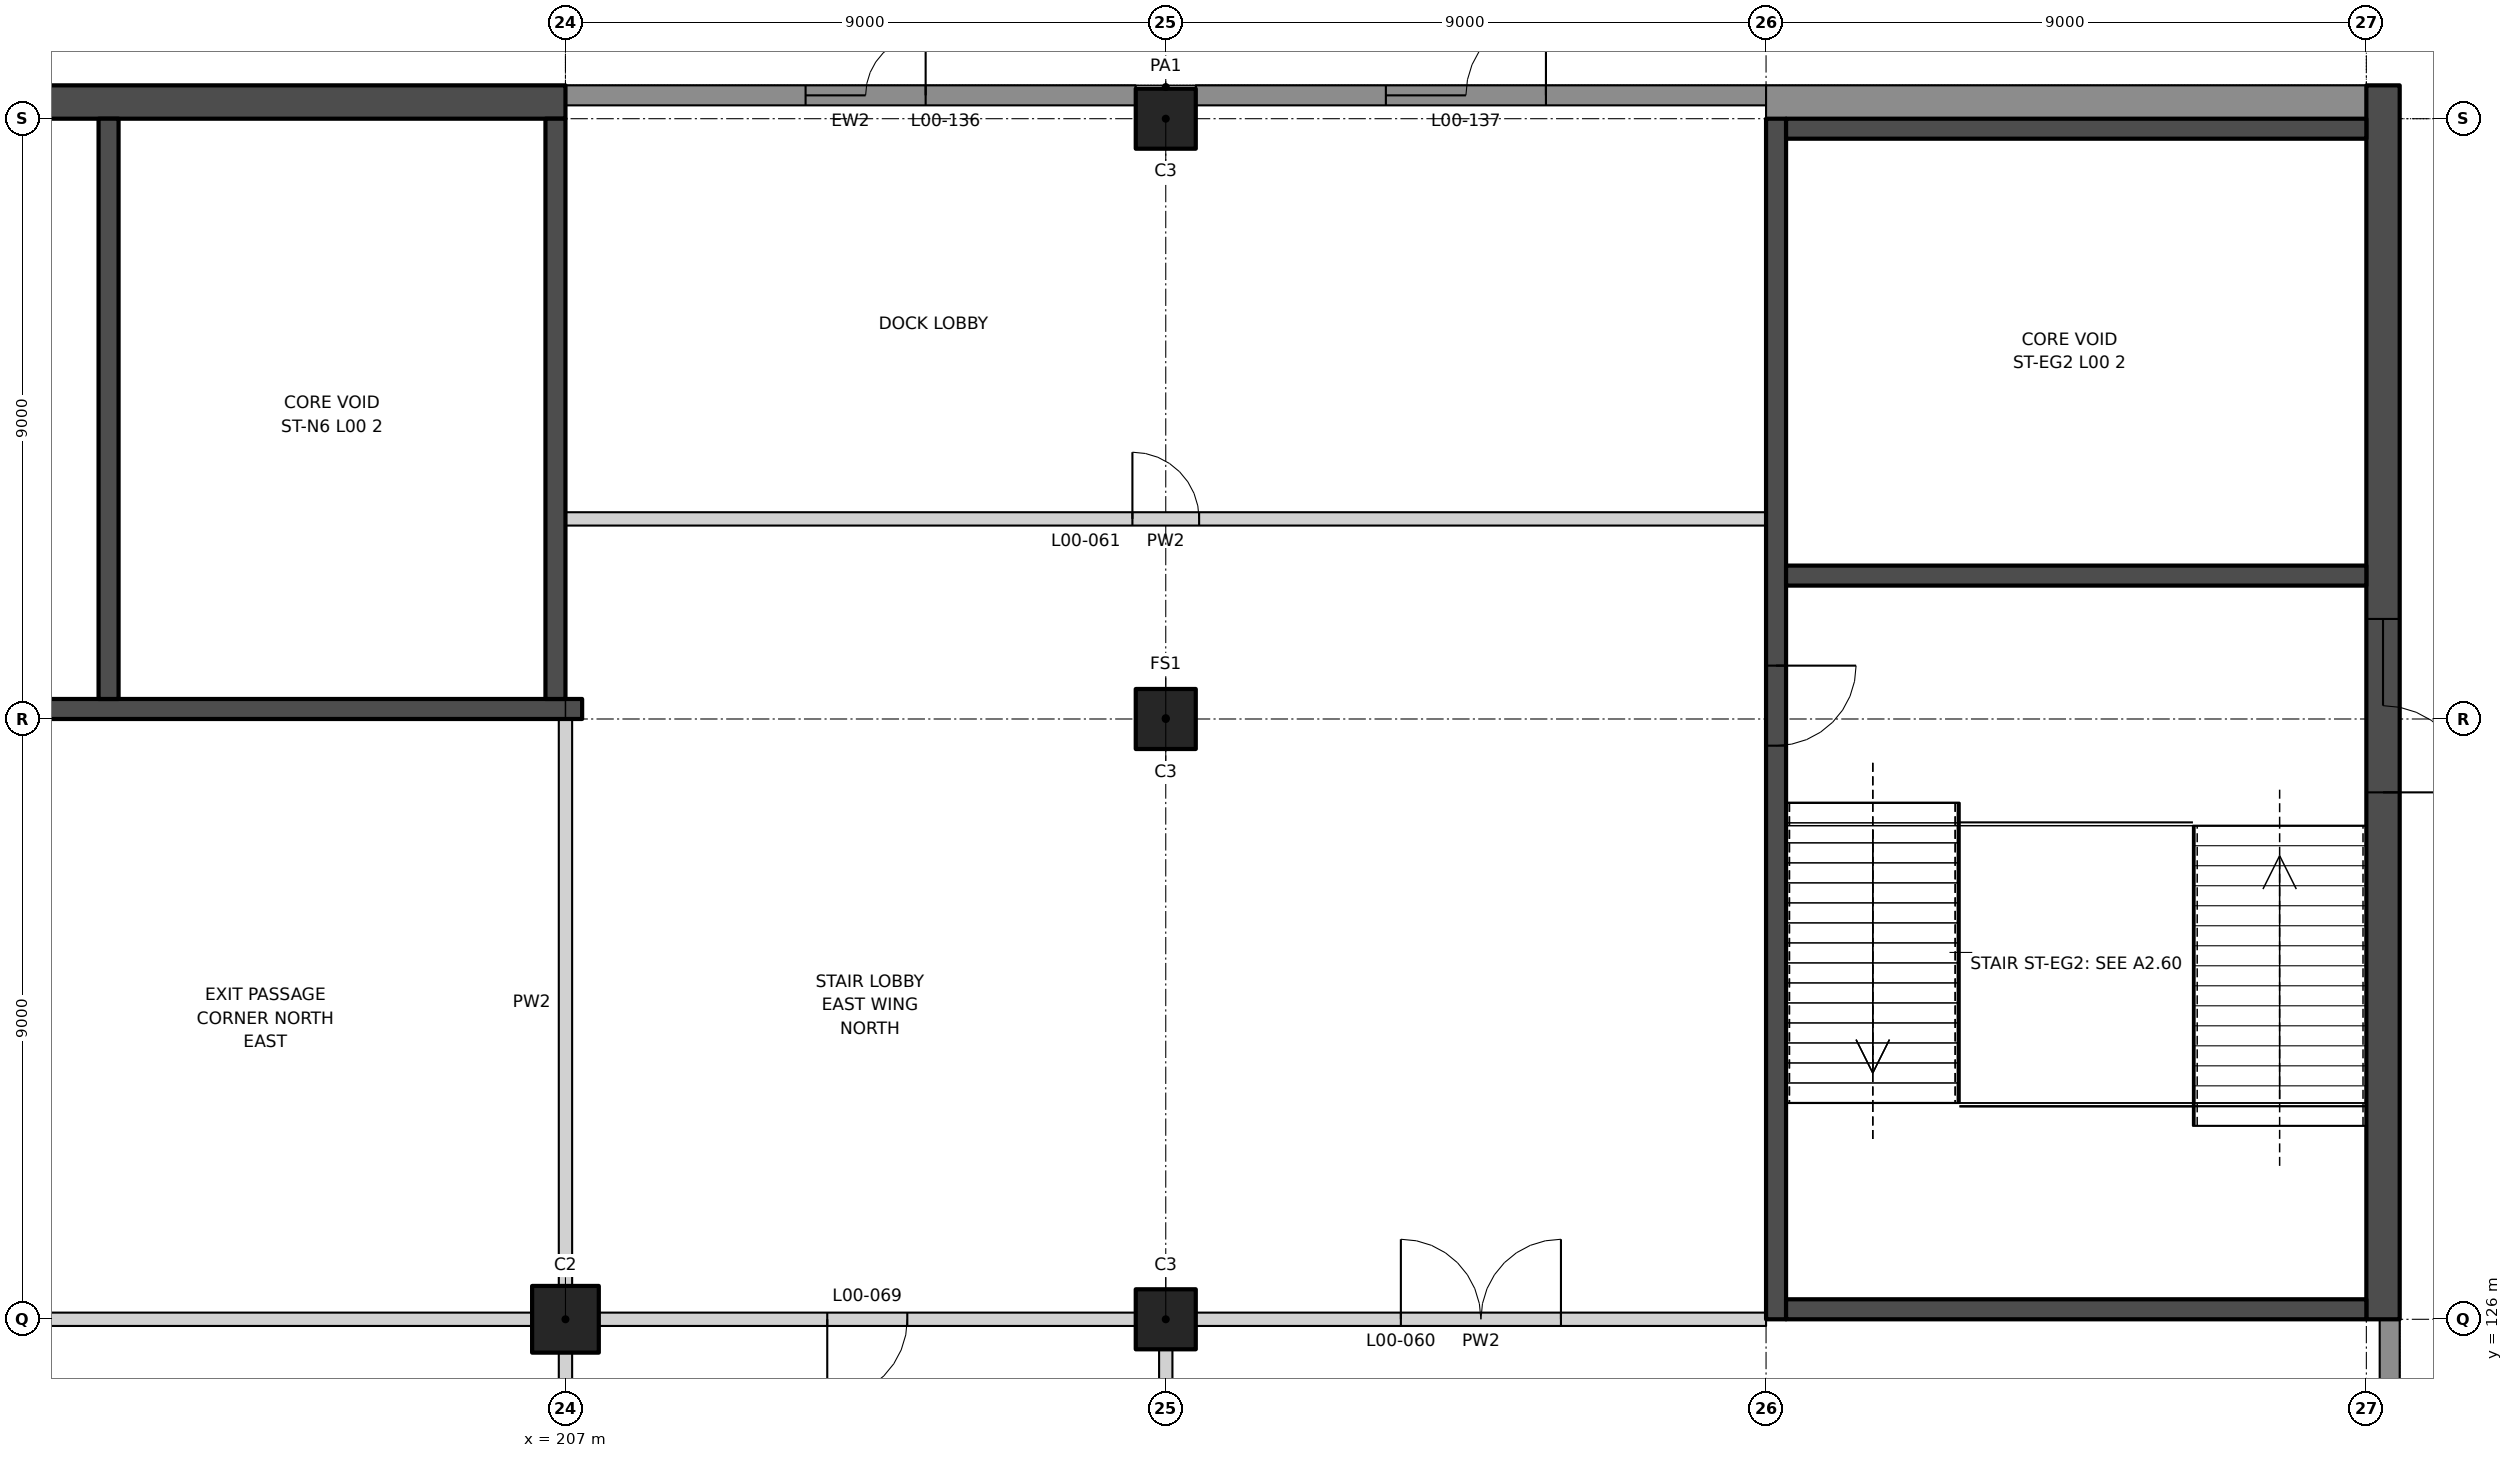
"""IFC4 building model, lengths in metres.
Left out: names, types, materials, properties, quantities, classifications, styles, units other than length and angle.
Written with IfcOpenShell. Run it as: python <this file> out.ifc"""

import sys

from ifc_helpers import new_model, si_unit, direction, frame, frame_2d, origin, origin_2d, place, context, subcontext, project, spatial, rectangle, extrude, element, fill, save


model = new_model("IFC4")
c1 = context("Model", 3, precision=1e-05, world=origin(), true_north=direction((0.0, 1.0)))
c2 = subcontext(c1, "Body", "Model", "MODEL_VIEW")
j1 = project(units=[si_unit("LENGTHUNIT", "METRE"), si_unit("PLANEANGLEUNIT", "RADIAN")], contexts=[c1])
p1 = place(None, origin())
s1 = spatial("IfcSite", under=j1, at=p1, CompositionType="ELEMENT")
p2 = place(p1, origin())
s2 = spatial("IfcBuilding", under=s1, at=p2, CompositionType="ELEMENT")
p3 = place(p2, origin())
s3 = spatial("IfcBuildingStorey", under=s2, at=p3, CompositionType="ELEMENT", Elevation=0.0)
p4 = place(p3, frame((207.0, 126.0, 0.0), z_axis=(0.0, 0.0, 1.0), x_axis=(1.0, 0.0, 0.0)))
e1 = element("IfcColumn", 1, at=p4, inside=s3, PredefinedType="COLUMN", context=c2, shape_type="SweptSolid", body=[
    extrude(rectangle(XDim=1.0, YDim=1.0, at=origin_2d()), origin(), (0.0, 0.0, 1.0), 7.0),
])
for number, where, z_axis, x_axis in (
    (2, (216.0, 126.0, 0.0), (0.0, 0.0, 1.0), (1.0, 0.0, 0.0)),
    (3, (216.0, 135.0, 0.0), (0.0, 0.0, 1.0), (1.0, 0.0, 0.0)),
    (4, (216.0, 144.0, 0.0), (0.0, 0.0, 1.0), (1.0, 0.0, 0.0)),
):
    element("IfcColumn", number, at=place(p3, frame(where, z_axis=z_axis, x_axis=x_axis)), inside=s3, PredefinedType="COLUMN", context=c2, shape_type="SweptSolid", body=[
        extrude(rectangle(XDim=0.9, YDim=0.9, at=origin_2d()), origin(), (0.0, 0.0, 1.0), 7.0),
    ])
p5 = place(p3, frame((198.45, 126.0, 0.0), z_axis=(0.0, 0.0, 1.0), x_axis=(1.0, 0.0, 0.0)))
e5 = element("IfcWall", 5, at=p5, inside=s3, PredefinedType="PARTITIONING", context=c2, shape_type="SweptSolid", body=[
    extrude(rectangle(XDim=8.05, YDim=0.2, at=frame_2d((4.025, 0.0))), origin(), (0.0, 0.0, 1.0), 5.75),
])
p6 = place(p3, frame((207.5, 126.0, 0.0), z_axis=(0.0, 0.0, 1.0), x_axis=(1.0, 0.0, 0.0)))
e6 = element("IfcWall", 6, at=p6, inside=s3, PredefinedType="PARTITIONING", context=c2, shape_type="SweptSolid", body=[
    extrude(rectangle(XDim=8.05, YDim=0.2, at=frame_2d((4.025, 0.0))), origin(), (0.0, 0.0, 1.0), 5.75),
])
p7 = place(p6, frame((3.425, 0.0, 0.0)))
e7 = element("IfcOpeningElement", 7, at=p7, cuts=e6, PredefinedType="OPENING", context=c2, shape_type="SweptSolid", body=[
    extrude(rectangle(XDim=1.2, YDim=2.1, at=frame_2d((0.6, 1.05))), frame((0.0, 0.11, 0.0), z_axis=(0.0, -1.0, 0.0), x_axis=(1.0, 0.0, 0.0)), (0.0, 0.0, 1.0), 0.22),
])
p8 = place(p3, frame((216.45, 126.0, 0.0), z_axis=(0.0, 0.0, 1.0), x_axis=(1.0, 0.0, 0.0)))
e8 = element("IfcWall", 8, at=p8, inside=s3, PredefinedType="PARTITIONING", context=c2, shape_type="SweptSolid", body=[
    extrude(rectangle(XDim=8.55, YDim=0.2, at=frame_2d((4.275, 0.0))), origin(), (0.0, 0.0, 1.0), 5.75),
])
p9 = place(p8, frame((3.075, 0.0, 0.0)))
e9 = element("IfcOpeningElement", 9, at=p9, cuts=e8, PredefinedType="OPENING", context=c2, shape_type="SweptSolid", body=[
    extrude(rectangle(XDim=2.4, YDim=2.4, at=frame_2d((1.2, 1.2))), frame((0.0, 0.11, 0.0), z_axis=(0.0, -1.0, 0.0), x_axis=(1.0, 0.0, 0.0)), (0.0, 0.0, 1.0), 0.22),
])
p10 = place(p3, frame((207.0, 138.0, 0.0), z_axis=(0.0, 0.0, 1.0), x_axis=(1.0, 0.0, 0.0)))
e10 = element("IfcWall", 10, at=p10, inside=s3, PredefinedType="PARTITIONING", context=c2, shape_type="SweptSolid", body=[
    extrude(rectangle(XDim=18.0, YDim=0.2, at=frame_2d((9.0, 0.0))), origin(), (0.0, 0.0, 1.0), 7.0),
])
p11 = place(p10, frame((8.5, 0.0, 0.0)))
e11 = element("IfcOpeningElement", 11, at=p11, cuts=e10, PredefinedType="OPENING", context=c2, shape_type="SweptSolid", body=[
    extrude(rectangle(XDim=1.0, YDim=2.1, at=frame_2d((0.5, 1.05))), frame((0.0, 0.11, 0.0), z_axis=(0.0, -1.0, 0.0), x_axis=(1.0, 0.0, 0.0)), (0.0, 0.0, 1.0), 0.22),
])
p12 = place(p3, frame((207.0, 117.5, 0.0), z_axis=(0.0, 0.0, 1.0), x_axis=(0.0, 1.0, 0.0)))
e12 = element("IfcWall", 12, at=p12, inside=s3, PredefinedType="PARTITIONING", context=c2, shape_type="SweptSolid", body=[
    extrude(rectangle(XDim=8.0, YDim=0.2, at=frame_2d((4.0, 0.0))), origin(), (0.0, 0.0, 1.0), 5.75),
])
p13 = place(p12, frame((0.2, 0.0, 0.0)))
e13 = element("IfcOpeningElement", 13, at=p13, cuts=e12, PredefinedType="OPENING", context=c2, shape_type="SweptSolid", body=[
    extrude(rectangle(XDim=1.0, YDim=2.1, at=frame_2d((0.5, 1.05))), frame((0.0, 0.11, 0.0), z_axis=(0.0, -1.0, 0.0), x_axis=(1.0, 0.0, 0.0)), (0.0, 0.0, 1.0), 0.22),
])
p14 = place(p3, frame((207.0, 126.5, 0.0), z_axis=(0.0, 0.0, 1.0), x_axis=(0.0, 1.0, 0.0)))
e14 = element("IfcWall", 14, at=p14, inside=s3, PredefinedType="PARTITIONING", context=c2, shape_type="SweptSolid", body=[
    extrude(rectangle(XDim=8.5, YDim=0.2, at=frame_2d((4.25, 0.0))), origin(), (0.0, 0.0, 1.0), 5.75),
])
p15 = place(p3, frame((216.0, 117.45, 0.0), z_axis=(0.0, 0.0, 1.0), x_axis=(0.0, 1.0, 0.0)))
e15 = element("IfcWall", 15, at=p15, inside=s3, PredefinedType="PARTITIONING", context=c2, shape_type="SweptSolid", body=[
    extrude(rectangle(XDim=8.1, YDim=0.2, at=frame_2d((4.05, 0.0))), origin(), (0.0, 0.0, 1.0), 5.75),
])
p16 = place(p3, frame((234.35, 117.45, 0.0), z_axis=(0.0, 0.0, 1.0), x_axis=(0.0, 1.0, 0.0)))
e16 = element("IfcWall", 16, at=p16, inside=s3, PredefinedType="SOLIDWALL", context=c2, shape_type="SweptSolid", body=[
    extrude(rectangle(XDim=8.55, YDim=0.3, at=frame_2d((4.275, 0.0))), origin(), (0.0, 0.0, 1.0), 7.0),
])
p17 = place(p16, frame((2.85, 0.0, 0.0)))
e17 = element("IfcOpeningElement", 17, at=p17, cuts=e16, PredefinedType="OPENING", context=c2, shape_type="SweptSolid", body=[
    extrude(rectangle(XDim=2.4, YDim=2.4, at=frame_2d((1.2, 1.2))), frame((0.0, 0.16, 0.0), z_axis=(0.0, -1.0, 0.0), x_axis=(1.0, 0.0, 0.0)), (0.0, 0.0, 1.0), 0.32),
])
p18 = place(p3, frame((215.55, 144.35, 0.0), z_axis=(0.0, 0.0, 1.0), x_axis=(-1.0, 0.0, 0.0)))
e18 = element("IfcWall", 18, at=p18, inside=s3, PredefinedType="SOLIDWALL", context=c2, shape_type="SweptSolid", body=[
    extrude(rectangle(XDim=8.55, YDim=0.3, at=frame_2d((4.275, 0.0))), origin(), (0.0, 0.0, 1.0), 7.0),
])
p19 = place(p18, frame((3.15, 0.0, 0.0)))
e19 = element("IfcOpeningElement", 19, at=p19, cuts=e18, PredefinedType="OPENING", context=c2, shape_type="SweptSolid", body=[
    extrude(rectangle(XDim=1.8, YDim=2.4, at=frame_2d((0.9, 1.2))), frame((0.0, 0.16, 0.0), z_axis=(0.0, -1.0, 0.0), x_axis=(1.0, 0.0, 0.0)), (0.0, 0.0, 1.0), 0.32),
])
p20 = place(p3, frame((225.0, 144.35, 0.0), z_axis=(0.0, 0.0, 1.0), x_axis=(-1.0, 0.0, 0.0)))
e20 = element("IfcWall", 20, at=p20, inside=s3, PredefinedType="SOLIDWALL", context=c2, shape_type="SweptSolid", body=[
    extrude(rectangle(XDim=8.55, YDim=0.3, at=frame_2d((4.275, 0.0))), origin(), (0.0, 0.0, 1.0), 7.0),
])
p21 = place(p20, frame((3.3, 0.0, 0.0)))
e21 = element("IfcOpeningElement", 21, at=p21, cuts=e20, PredefinedType="OPENING", context=c2, shape_type="SweptSolid", body=[
    extrude(rectangle(XDim=2.4, YDim=2.4, at=frame_2d((1.2, 1.2))), frame((0.0, 0.16, 0.0), z_axis=(0.0, -1.0, 0.0), x_axis=(1.0, 0.0, 0.0)), (0.0, 0.0, 1.0), 0.32),
])
p22 = place(p3, frame((234.0, 144.25, 0.0), z_axis=(0.0, 0.0, 1.0), x_axis=(-1.0, 0.0, 0.0)))
e22 = element("IfcWall", 22, at=p22, inside=s3, PredefinedType="SOLIDWALL", context=c2, shape_type="SweptSolid", body=[
    extrude(rectangle(XDim=9.0, YDim=0.5, at=frame_2d((4.5, 0.0))), origin(), (0.0, 0.0, 1.0), 7.0),
])
p23 = place(p3, frame((189.0, 135.15, 0.0), z_axis=(0.0, 0.0, 1.0), x_axis=(1.0, 0.0, 0.0)))
e23 = element("IfcWall", 23, at=p23, inside=s3, PredefinedType="SHEAR", context=c2, shape_type="SweptSolid", body=[
    extrude(rectangle(XDim=18.25, YDim=0.3, at=frame_2d((9.125, 0.0))), origin(), (0.0, 0.0, 1.0), 7.0),
])
p24 = place(p23, frame((1.5, 0.0, 0.0)))
e24 = element("IfcOpeningElement", 24, at=p24, cuts=e23, PredefinedType="OPENING", context=c2, shape_type="SweptSolid", body=[
    extrude(rectangle(XDim=1.2, YDim=2.1, at=frame_2d((0.6, 1.05))), frame((0.0, 0.16, 0.0), z_axis=(0.0, -1.0, 0.0), x_axis=(1.0, 0.0, 0.0)), (0.0, 0.0, 1.0), 0.32),
])
p25 = place(p3, frame((189.0, 144.25, 0.0), z_axis=(0.0, 0.0, 1.0), x_axis=(1.0, 0.0, 0.0)))
e25 = element("IfcWall", 25, at=p25, inside=s3, PredefinedType="SHEAR", context=c2, shape_type="SweptSolid", body=[
    extrude(rectangle(XDim=18.0, YDim=0.5, at=frame_2d((9.0, 0.0))), origin(), (0.0, 0.0, 1.0), 7.0),
])
p26 = place(p25, frame((0.8, 0.0, 0.0)))
e26 = element("IfcOpeningElement", 26, at=p26, cuts=e25, PredefinedType="OPENING", context=c2, shape_type="SweptSolid", body=[
    extrude(rectangle(XDim=2.6, YDim=2.4, at=frame_2d((1.3, 1.2))), frame((0.0, 0.26, 0.0), z_axis=(0.0, -1.0, 0.0), x_axis=(1.0, 0.0, 0.0)), (0.0, 0.0, 1.0), 0.52),
])
for number, where, z_axis, x_axis in (
    (27, (206.85, 135.3, 0.0), (0.0, 0.0, 1.0), (0.0, 1.0, 0.0)),
    (28, (200.15, 135.3, 0.0), (0.0, 0.0, 1.0), (0.0, 1.0, 0.0)),
):
    element("IfcWall", number, at=place(p3, frame(where, z_axis=z_axis, x_axis=x_axis)), inside=s3, PredefinedType="SHEAR", context=c2, shape_type="SweptSolid", body=[
        extrude(rectangle(XDim=8.7, YDim=0.3, at=frame_2d((4.35, 0.0))), origin(), (0.0, 0.0, 1.0), 7.0),
    ])
p27 = place(p3, frame((225.15, 126.0, 0.0), z_axis=(0.0, 0.0, 1.0), x_axis=(0.0, 1.0, 0.0)))
e29 = element("IfcWall", 29, at=p27, inside=s3, PredefinedType="SHEAR", context=c2, shape_type="SweptSolid", body=[
    extrude(rectangle(XDim=18.0, YDim=0.3, at=frame_2d((9.0, 0.0))), origin(), (0.0, 0.0, 1.0), 7.0),
])
p28 = place(p27, frame((8.6, 0.0, 0.0)))
e30 = element("IfcOpeningElement", 30, at=p28, cuts=e29, PredefinedType="OPENING", context=c2, shape_type="SweptSolid", body=[
    extrude(rectangle(XDim=1.2, YDim=2.1, at=frame_2d((0.6, 1.05))), frame((0.0, 0.16, 0.0), z_axis=(0.0, -1.0, 0.0), x_axis=(1.0, 0.0, 0.0)), (0.0, 0.0, 1.0), 0.32),
])
p29 = place(p3, frame((234.25, 126.0, 0.0), z_axis=(0.0, 0.0, 1.0), x_axis=(0.0, 1.0, 0.0)))
e31 = element("IfcWall", 31, at=p29, inside=s3, PredefinedType="SHEAR", context=c2, shape_type="SweptSolid", body=[
    extrude(rectangle(XDim=18.5, YDim=0.5, at=frame_2d((9.25, 0.0))), origin(), (0.0, 0.0, 1.0), 7.0),
])
p30 = place(p29, frame((7.9, 0.0, 0.0)))
e32 = element("IfcOpeningElement", 32, at=p30, cuts=e31, PredefinedType="OPENING", context=c2, shape_type="SweptSolid", body=[
    extrude(rectangle(XDim=2.6, YDim=2.4, at=frame_2d((1.3, 1.2))), frame((0.0, 0.26, 0.0), z_axis=(0.0, -1.0, 0.0), x_axis=(1.0, 0.0, 0.0)), (0.0, 0.0, 1.0), 0.52),
])
for number, where, z_axis, x_axis in (
    (33, (225.3, 126.15, 0.0), (0.0, 0.0, 1.0), (1.0, 0.0, 0.0)),
    (34, (225.3, 143.85, 0.0), (0.0, 0.0, 1.0), (1.0, 0.0, 0.0)),
    (35, (225.3, 137.15, 0.0), (0.0, 0.0, 1.0), (1.0, 0.0, 0.0)),
):
    element("IfcWall", number, at=place(p3, frame(where, z_axis=z_axis, x_axis=x_axis)), inside=s3, PredefinedType="SHEAR", context=c2, shape_type="SweptSolid", body=[
        extrude(rectangle(XDim=8.7, YDim=0.3, at=frame_2d((4.35, 0.0))), origin(), (0.0, 0.0, 1.0), 7.0),
    ])
p31 = place(p9, origin())
e36 = element("IfcDoor", 36, at=p31, inside=s3, OperationType="DOUBLE_DOOR_DOUBLE_SWING", PredefinedType="DOOR", context=c2, shape_type="SweptSolid", body=[
    extrude(rectangle(XDim=2.4, YDim=2.4, at=frame_2d((1.2, 1.2))), frame((0.0, 0.025, 0.0), z_axis=(0.0, -1.0, 0.0), x_axis=(1.0, 0.0, 0.0)), (0.0, 0.0, 1.0), 0.05),
])
fill(e9, e36)
p32 = place(p11, origin())
e37 = element("IfcDoor", 37, at=p32, inside=s3, OperationType="SINGLE_SWING_LEFT", PredefinedType="DOOR", context=c2, shape_type="SweptSolid", body=[
    extrude(rectangle(XDim=1.0, YDim=2.1, at=frame_2d((0.5, 1.05))), frame((0.0, 0.025, 0.0), z_axis=(0.0, -1.0, 0.0), x_axis=(1.0, 0.0, 0.0)), (0.0, 0.0, 1.0), 0.05),
])
fill(e11, e37)
p33 = place(p7, frame((1.2, 0.0, 0.0), z_axis=(0.0, 0.0, 1.0), x_axis=(-1.0, 0.0, 0.0)))
e38 = element("IfcDoor", 38, at=p33, inside=s3, OperationType="SINGLE_SWING_RIGHT", PredefinedType="DOOR", context=c2, shape_type="SweptSolid", body=[
    extrude(rectangle(XDim=1.2, YDim=2.1, at=frame_2d((0.6, 1.05))), frame((0.0, 0.025, 0.0), z_axis=(0.0, -1.0, 0.0), x_axis=(1.0, 0.0, 0.0)), (0.0, 0.0, 1.0), 0.05),
])
fill(e7, e38)
p34 = place(p19, frame((1.8, 0.0, 0.0), z_axis=(0.0, 0.0, 1.0), x_axis=(-1.0, 0.0, 0.0)))
e39 = element("IfcDoor", 39, at=p34, inside=s3, OperationType="DOUBLE_DOOR_SINGLE_SWING", PredefinedType="DOOR", context=c2, shape_type="SweptSolid", body=[
    extrude(rectangle(XDim=1.8, YDim=2.4, at=frame_2d((0.9, 1.2))), frame((0.0, 0.025, 0.0), z_axis=(0.0, -1.0, 0.0), x_axis=(1.0, 0.0, 0.0)), (0.0, 0.0, 1.0), 0.05),
])
fill(e19, e39)
p35 = place(p21, frame((2.4, 0.0, 0.0), z_axis=(0.0, 0.0, 1.0), x_axis=(-1.0, 0.0, 0.0)))
e40 = element("IfcDoor", 40, at=p35, inside=s3, OperationType="DOUBLE_DOOR_SINGLE_SWING", PredefinedType="DOOR", context=c2, shape_type="SweptSolid", body=[
    extrude(rectangle(XDim=2.4, YDim=2.4, at=frame_2d((1.2, 1.2))), frame((0.0, 0.025, 0.0), z_axis=(0.0, -1.0, 0.0), x_axis=(1.0, 0.0, 0.0)), (0.0, 0.0, 1.0), 0.05),
])
fill(e21, e40)
p36 = place(p28, frame((1.2, 0.0, 0.0), z_axis=(0.0, 0.0, 1.0), x_axis=(-1.0, 0.0, 0.0)))
e41 = element("IfcDoor", 41, at=p36, inside=s3, OperationType="SINGLE_SWING_LEFT", PredefinedType="DOOR", context=c2, shape_type="SweptSolid", body=[
    extrude(rectangle(XDim=1.2, YDim=2.1, at=frame_2d((0.6, 1.05))), frame((0.0, 0.025, 0.0), z_axis=(0.0, -1.0, 0.0), x_axis=(1.0, 0.0, 0.0)), (0.0, 0.0, 1.0), 0.05),
])
fill(e30, e41)
p37 = place(p30, frame((2.6, 0.0, 0.0), z_axis=(0.0, 0.0, 1.0), x_axis=(-1.0, 0.0, 0.0)))
e42 = element("IfcDoor", 42, at=p37, inside=s3, OperationType="DOUBLE_DOOR_SINGLE_SWING", PredefinedType="DOOR", context=c2, shape_type="SweptSolid", body=[
    extrude(rectangle(XDim=2.6, YDim=2.4, at=frame_2d((1.3, 1.2))), frame((0.0, 0.025, 0.0), z_axis=(0.0, -1.0, 0.0), x_axis=(1.0, 0.0, 0.0)), (0.0, 0.0, 1.0), 0.05),
])
fill(e32, e42)
save(model, sys.argv[1])
